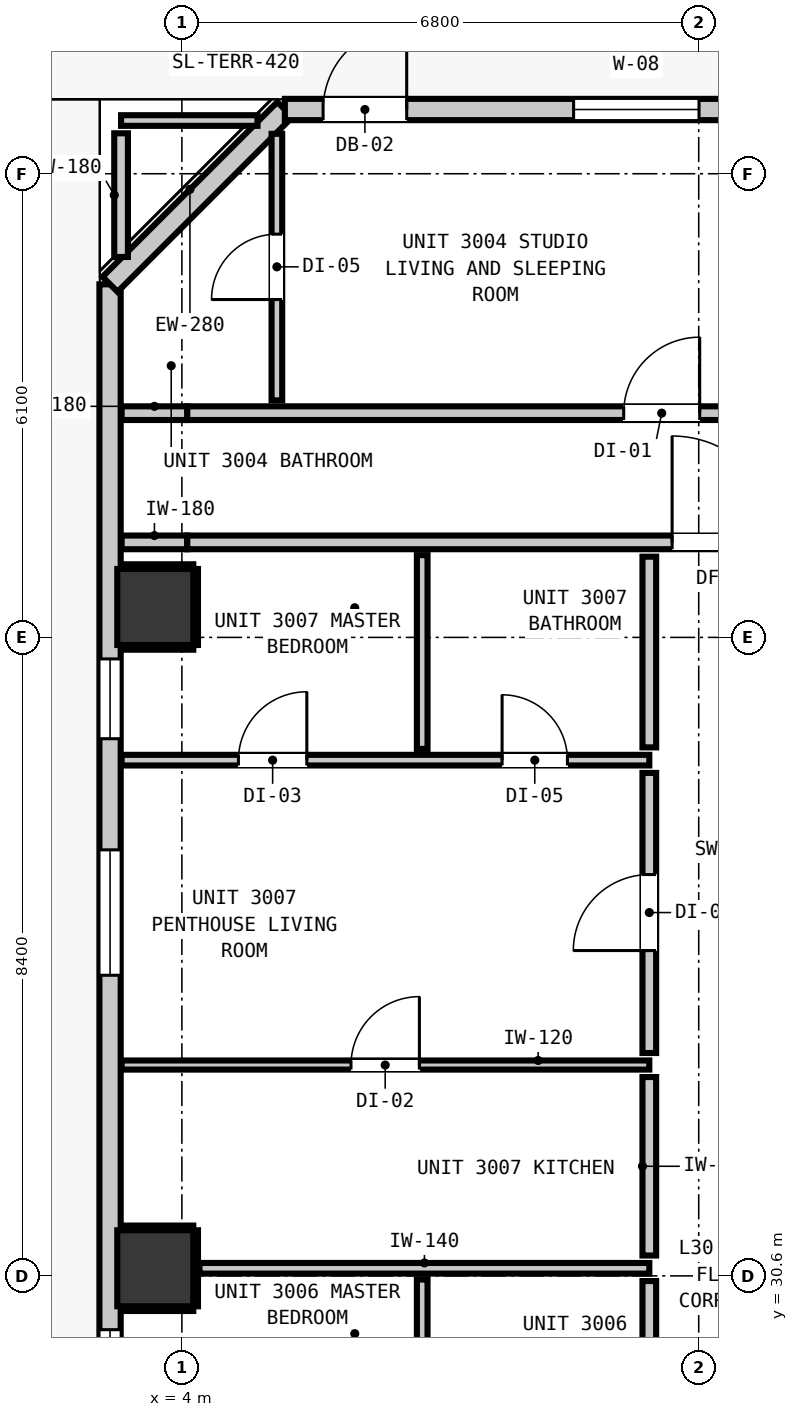
"""IFC4 building model, lengths in metres.
Left out: names, types, materials, properties, quantities, classifications, styles, units other than length and angle.
Written with IfcOpenShell. Run it as: python <this file> out.ifc"""

import sys

from ifc_helpers import new_model, si_unit, direction, frame, frame_2d, origin, origin_2d, place, context, subcontext, project, spatial, rectangle, extrude, element, fill, save


model = new_model("IFC4")
c1 = context("Model", 3, precision=1e-05, world=origin(), true_north=direction((0.0, 1.0)))
c2 = subcontext(c1, "Body", "Model", "MODEL_VIEW")
j1 = project(units=[si_unit("LENGTHUNIT", "METRE"), si_unit("PLANEANGLEUNIT", "RADIAN")], contexts=[c1])
p1 = place(None, origin())
s1 = spatial("IfcSite", under=j1, at=p1, CompositionType="ELEMENT")
p2 = place(p1, origin())
s2 = spatial("IfcBuilding", under=s1, at=p2, CompositionType="ELEMENT")
p3 = place(p2, frame((0.0, 0.0, 106.08)))
s3 = spatial("IfcBuildingStorey", under=s2, at=p3, CompositionType="ELEMENT", Elevation=106.08)
for number, where, z_axis, x_axis in (
    (1, (3.65, 30.7, -0.2), (0.0, 0.0, 1.0), (1.0, 0.0, 0.0)),
    (2, (3.65, 39.4, -0.2), (0.0, 0.0, 1.0), (1.0, 0.0, 0.0)),
):
    element("IfcColumn", number, at=place(p3, frame(where, z_axis=z_axis, x_axis=x_axis)), inside=s3, PredefinedType="COLUMN", context=c2, shape_type="SweptSolid", body=[
        extrude(rectangle(XDim=1.0, YDim=1.0, at=origin_2d()), origin(), (0.0, 0.0, 1.0), 3.52),
    ])
p4 = place(p3, frame((3.055, 11.355, 0.0), z_axis=(0.0, 0.0, 1.0), x_axis=(0.0, 1.0, 0.0)))
e3 = element("IfcWall", 3, at=p4, inside=s3, PredefinedType="STANDARD", context=c2, shape_type="SweptSolid", body=[
    extrude(rectangle(XDim=32.29, YDim=0.28, at=frame_2d((16.145, 0.0))), origin(), (0.0, 0.0, 1.0), 3.08),
])
p5 = place(p4, frame((6.119, 0.0, 0.0)))
e4 = element("IfcOpeningElement", 4, at=p5, cuts=e3, PredefinedType="OPENING", context=c2, shape_type="SweptSolid", body=[
    extrude(rectangle(XDim=1.1, YDim=2.15, at=frame_2d((0.55, 1.075))), frame((0.0, 0.15, 0.0), z_axis=(0.0, -1.0, 0.0), x_axis=(1.0, 0.0, 0.0)), (0.0, 0.0, 1.0), 0.3),
])
p6 = place(p4, frame((0.545, 0.0, 0.85)))
e5 = element("IfcOpeningElement", 5, at=p6, cuts=e3, PredefinedType="OPENING", context=c2, shape_type="SweptSolid", body=[
    extrude(rectangle(XDim=1.05, YDim=1.65, at=frame_2d((0.525, 0.825))), frame((0.0, 0.15, 0.0), z_axis=(0.0, -1.0, 0.0), x_axis=(1.0, 0.0, 0.0)), (0.0, 0.0, 1.0), 0.3),
])
p7 = place(p4, frame((13.649, 0.0, 0.85)))
e6 = element("IfcOpeningElement", 6, at=p7, cuts=e3, PredefinedType="OPENING", context=c2, shape_type="SweptSolid", body=[
    extrude(rectangle(XDim=1.65, YDim=1.75, at=frame_2d((0.825, 0.875))), frame((0.0, 0.15, 0.0), z_axis=(0.0, -1.0, 0.0), x_axis=(1.0, 0.0, 0.0)), (0.0, 0.0, 1.0), 0.3),
])
p8 = place(p4, frame((16.887, 0.0, 0.85)))
e7 = element("IfcOpeningElement", 7, at=p8, cuts=e3, PredefinedType="OPENING", context=c2, shape_type="SweptSolid", body=[
    extrude(rectangle(XDim=1.65, YDim=1.75, at=frame_2d((0.825, 0.875))), frame((0.0, 0.15, 0.0), z_axis=(0.0, -1.0, 0.0), x_axis=(1.0, 0.0, 0.0)), (0.0, 0.0, 1.0), 0.3),
])
p9 = place(p4, frame((23.2, 0.0, 0.85)))
e8 = element("IfcOpeningElement", 8, at=p9, cuts=e3, PredefinedType="OPENING", context=c2, shape_type="SweptSolid", body=[
    extrude(rectangle(XDim=1.65, YDim=1.75, at=frame_2d((0.825, 0.875))), frame((0.0, 0.15, 0.0), z_axis=(0.0, -1.0, 0.0), x_axis=(1.0, 0.0, 0.0)), (0.0, 0.0, 1.0), 0.3),
])
p10 = place(p4, frame((26.312, 0.0, 0.85)))
e9 = element("IfcOpeningElement", 9, at=p10, cuts=e3, PredefinedType="OPENING", context=c2, shape_type="SweptSolid", body=[
    extrude(rectangle(XDim=1.05, YDim=1.65, at=frame_2d((0.525, 0.825))), frame((0.0, 0.15, 0.0), z_axis=(0.0, -1.0, 0.0), x_axis=(1.0, 0.0, 0.0)), (0.0, 0.0, 1.0), 0.3),
])
p11 = place(p3, frame((3.055, 43.645, 0.0), z_axis=(0.0, 0.0, 1.0), x_axis=(0.707106781187, 0.707106781187, 0.0)))
e10 = element("IfcWall", 10, at=p11, inside=s3, PredefinedType="STANDARD", context=c2, shape_type="SweptSolid", body=[
    extrude(rectangle(XDim=3.253, YDim=0.28, at=frame_2d((1.626, 0.0))), origin(), (0.0, 0.0, 1.0), 3.08),
])
p12 = place(p3, frame((5.355, 45.945, 0.0), z_axis=(0.0, 0.0, 1.0), x_axis=(1.0, 0.0, 0.0)))
e11 = element("IfcWall", 11, at=p12, inside=s3, PredefinedType="STANDARD", context=c2, shape_type="SweptSolid", body=[
    extrude(rectangle(XDim=35.09, YDim=0.28, at=frame_2d((17.545, 0.0))), origin(), (0.0, 0.0, 1.0), 3.08),
])
p13 = place(p12, frame((0.503, 0.0, 0.0)))
e12 = element("IfcOpeningElement", 12, at=p13, cuts=e11, PredefinedType="OPENING", context=c2, shape_type="SweptSolid", body=[
    extrude(rectangle(XDim=1.1, YDim=2.15, at=frame_2d((0.55, 1.075))), frame((0.0, 0.15, 0.0), z_axis=(0.0, -1.0, 0.0), x_axis=(1.0, 0.0, 0.0)), (0.0, 0.0, 1.0), 0.3),
])
p14 = place(p12, frame((3.799, 0.0, 0.85)))
e13 = element("IfcOpeningElement", 13, at=p14, cuts=e11, PredefinedType="OPENING", context=c2, shape_type="SweptSolid", body=[
    extrude(rectangle(XDim=1.65, YDim=1.75, at=frame_2d((0.825, 0.875))), frame((0.0, 0.15, 0.0), z_axis=(0.0, -1.0, 0.0), x_axis=(1.0, 0.0, 0.0)), (0.0, 0.0, 1.0), 0.3),
])
p15 = place(p12, frame((18.82, 0.0, 0.85)))
e14 = element("IfcOpeningElement", 14, at=p15, cuts=e11, PredefinedType="OPENING", context=c2, shape_type="SweptSolid", body=[
    extrude(rectangle(XDim=1.65, YDim=1.75, at=frame_2d((0.825, 0.875))), frame((0.0, 0.15, 0.0), z_axis=(0.0, -1.0, 0.0), x_axis=(1.0, 0.0, 0.0)), (0.0, 0.0, 1.0), 0.3),
])
p16 = place(p12, frame((27.709, 0.0, 0.85)))
e15 = element("IfcOpeningElement", 15, at=p16, cuts=e11, PredefinedType="OPENING", context=c2, shape_type="SweptSolid", body=[
    extrude(rectangle(XDim=1.65, YDim=1.75, at=frame_2d((0.825, 0.875))), frame((0.0, 0.15, 0.0), z_axis=(0.0, -1.0, 0.0), x_axis=(1.0, 0.0, 0.0)), (0.0, 0.0, 1.0), 0.3),
])
p17 = place(p3, frame((3.207, 40.25, 0.0), z_axis=(0.0, 0.0, 1.0), x_axis=(1.0, 0.0, 0.0)))
e16 = element("IfcWall", 16, at=p17, inside=s3, PredefinedType="PARTITIONING", context=c2, shape_type="SweptSolid", body=[
    extrude(rectangle(XDim=0.864, YDim=0.18, at=frame_2d((0.432, 0.0))), origin(), (0.0, 0.0, 1.0), 3.08),
])
p18 = place(p3, frame((4.071, 40.25, 0.0), z_axis=(0.0, 0.0, 1.0), x_axis=(1.0, 0.0, 0.0)))
e17 = element("IfcWall", 17, at=p18, inside=s3, PredefinedType="PARTITIONING", context=c2, shape_type="SweptSolid", body=[
    extrude(rectangle(XDim=8.908, YDim=0.18, at=frame_2d((4.454, 0.0))), origin(), (0.0, 0.0, 1.0), 2.565),
])
p19 = place(p18, frame((6.379, 0.0, 0.0)))
e18 = element("IfcOpeningElement", 18, at=p19, cuts=e17, PredefinedType="OPENING", context=c2, shape_type="SweptSolid", body=[
    extrude(rectangle(XDim=1.4, YDim=2.15, at=frame_2d((0.7, 1.075))), frame((0.0, 0.1, 0.0), z_axis=(0.0, -1.0, 0.0), x_axis=(1.0, 0.0, 0.0)), (0.0, 0.0, 1.0), 0.2),
])
p20 = place(p3, frame((3.207, 41.95, 0.0), z_axis=(0.0, 0.0, 1.0), x_axis=(1.0, 0.0, 0.0)))
e19 = element("IfcWall", 19, at=p20, inside=s3, PredefinedType="PARTITIONING", context=c2, shape_type="SweptSolid", body=[
    extrude(rectangle(XDim=0.864, YDim=0.18, at=frame_2d((0.432, 0.0))), origin(), (0.0, 0.0, 1.0), 3.08),
])
p21 = place(p3, frame((4.071, 41.95, 0.0), z_axis=(0.0, 0.0, 1.0), x_axis=(1.0, 0.0, 0.0)))
e20 = element("IfcWall", 20, at=p21, inside=s3, PredefinedType="PARTITIONING", context=c2, shape_type="SweptSolid", body=[
    extrude(rectangle(XDim=8.908, YDim=0.18, at=frame_2d((4.454, 0.0))), origin(), (0.0, 0.0, 1.0), 2.565),
])
p22 = place(p21, frame((5.742, 0.0, 0.0)))
e21 = element("IfcOpeningElement", 21, at=p22, cuts=e20, PredefinedType="OPENING", context=c2, shape_type="SweptSolid", body=[
    extrude(rectangle(XDim=1.0, YDim=2.15, at=frame_2d((0.5, 1.075))), frame((0.0, 0.1, 0.0), z_axis=(0.0, -1.0, 0.0), x_axis=(1.0, 0.0, 0.0)), (0.0, 0.0, 1.0), 0.2),
])
p23 = place(p3, frame((4.232, 30.7, 0.0), z_axis=(0.0, 0.0, 1.0), x_axis=(1.0, 0.0, 0.0)))
e22 = element("IfcWall", 22, at=p23, inside=s3, PredefinedType="PARTITIONING", context=c2, shape_type="SweptSolid", body=[
    extrude(rectangle(XDim=5.918, YDim=0.14, at=frame_2d((2.959, 0.0))), origin(), (0.0, 0.0, 1.0), 2.315),
])
p24 = place(p3, frame((3.207, 37.385, 0.0), z_axis=(0.0, 0.0, 1.0), x_axis=(1.0, 0.0, 0.0)))
e23 = element("IfcWall", 23, at=p24, inside=s3, PredefinedType="PARTITIONING", context=c2, shape_type="SweptSolid", body=[
    extrude(rectangle(XDim=6.943, YDim=0.14, at=frame_2d((3.471, 0.0))), origin(), (0.0, 0.0, 1.0), 3.08),
])
p25 = place(p24, frame((5.006, 0.0, 0.0)))
e24 = element("IfcOpeningElement", 24, at=p25, cuts=e23, PredefinedType="OPENING", context=c2, shape_type="SweptSolid", body=[
    extrude(rectangle(XDim=0.86, YDim=2.02, at=frame_2d((0.43, 1.01))), frame((0.0, 0.08, 0.0), z_axis=(0.0, -1.0, 0.0), x_axis=(1.0, 0.0, 0.0)), (0.0, 0.0, 1.0), 0.16),
])
p26 = place(p24, frame((1.537, 0.0, 0.0)))
e25 = element("IfcOpeningElement", 25, at=p26, cuts=e23, PredefinedType="OPENING", context=c2, shape_type="SweptSolid", body=[
    extrude(rectangle(XDim=0.9, YDim=2.1, at=frame_2d((0.45, 1.05))), frame((0.0, 0.08, 0.0), z_axis=(0.0, -1.0, 0.0), x_axis=(1.0, 0.0, 0.0)), (0.0, 0.0, 1.0), 0.16),
])
p27 = place(p3, frame((3.2, 45.8, 0.0), z_axis=(0.0, 0.0, 1.0), x_axis=(1.0, 0.0, 0.0)))
e26 = element("IfcWall", 26, at=p27, inside=s3, PredefinedType="PARTITIONING", context=c2, shape_type="SweptSolid", body=[
    extrude(rectangle(XDim=1.795, YDim=0.14, at=frame_2d((0.897, 0.0))), origin(), (0.0, 0.0, 1.0), 3.08),
])
p28 = place(p3, frame((3.207, 33.374, 0.0), z_axis=(0.0, 0.0, 1.0), x_axis=(1.0, 0.0, 0.0)))
e27 = element("IfcWall", 27, at=p28, inside=s3, PredefinedType="PARTITIONING", context=c2, shape_type="SweptSolid", body=[
    extrude(rectangle(XDim=6.943, YDim=0.12, at=frame_2d((3.471, 0.0))), origin(), (0.0, 0.0, 1.0), 3.08),
])
p29 = place(p28, frame((3.018, 0.0, 0.0)))
e28 = element("IfcOpeningElement", 28, at=p29, cuts=e27, PredefinedType="OPENING", context=c2, shape_type="SweptSolid", body=[
    extrude(rectangle(XDim=0.9, YDim=2.1, at=frame_2d((0.45, 1.05))), frame((0.0, 0.07, 0.0), z_axis=(0.0, -1.0, 0.0), x_axis=(1.0, 0.0, 0.0)), (0.0, 0.0, 1.0), 0.14),
])
p30 = place(p3, frame((3.2, 44.005, 0.0), z_axis=(0.0, 0.0, 1.0), x_axis=(0.0, 1.0, 0.0)))
e29 = element("IfcWall", 29, at=p30, inside=s3, PredefinedType="PARTITIONING", context=c2, shape_type="SweptSolid", body=[
    extrude(rectangle(XDim=1.627, YDim=0.18, at=frame_2d((0.813, 0.0))), origin(), (0.0, 0.0, 1.0), 3.08),
])
p31 = place(p3, frame((10.15, 28.003, 0.0), z_axis=(0.0, 0.0, 1.0), x_axis=(0.0, 1.0, 0.0)))
e30 = element("IfcWall", 30, at=p31, inside=s3, PredefinedType="PARTITIONING", context=c2, shape_type="SweptSolid", body=[
    extrude(rectangle(XDim=2.529, YDim=0.18, at=frame_2d((1.265, 0.0))), origin(), (0.0, 0.0, 1.0), 3.08),
])
p32 = place(p3, frame((10.15, 30.868, 0.0), z_axis=(0.0, 0.0, 1.0), x_axis=(0.0, 1.0, 0.0)))
e31 = element("IfcWall", 31, at=p32, inside=s3, PredefinedType="PARTITIONING", context=c2, shape_type="SweptSolid", body=[
    extrude(rectangle(XDim=2.348, YDim=0.18, at=frame_2d((1.174, 0.0))), origin(), (0.0, 0.0, 1.0), 3.08),
])
p33 = place(p3, frame((10.15, 33.532, 0.0), z_axis=(0.0, 0.0, 1.0), x_axis=(0.0, 1.0, 0.0)))
e32 = element("IfcWall", 32, at=p33, inside=s3, PredefinedType="PARTITIONING", context=c2, shape_type="SweptSolid", body=[
    extrude(rectangle(XDim=3.685, YDim=0.18, at=frame_2d((1.843, 0.0))), origin(), (0.0, 0.0, 1.0), 3.08),
])
p34 = place(p33, frame((1.348, 0.0, 0.0)))
e33 = element("IfcOpeningElement", 33, at=p34, cuts=e32, PredefinedType="OPENING", context=c2, shape_type="SweptSolid", body=[
    extrude(rectangle(XDim=1.0, YDim=2.15, at=frame_2d((0.5, 1.075))), frame((0.0, 0.1, 0.0), z_axis=(0.0, -1.0, 0.0), x_axis=(1.0, 0.0, 0.0)), (0.0, 0.0, 1.0), 0.2),
])
p35 = place(p3, frame((10.15, 37.553, 0.0), z_axis=(0.0, 0.0, 1.0), x_axis=(0.0, 1.0, 0.0)))
e34 = element("IfcWall", 34, at=p35, inside=s3, PredefinedType="PARTITIONING", context=c2, shape_type="SweptSolid", body=[
    extrude(rectangle(XDim=2.509, YDim=0.18, at=frame_2d((1.254, 0.0))), origin(), (0.0, 0.0, 1.0), 3.08),
])
p36 = place(p3, frame((5.25, 42.118, 0.0), z_axis=(0.0, 0.0, 1.0), x_axis=(0.0, 1.0, 0.0)))
e35 = element("IfcWall", 35, at=p36, inside=s3, PredefinedType="PARTITIONING", context=c2, shape_type="SweptSolid", body=[
    extrude(rectangle(XDim=3.507, YDim=0.14, at=frame_2d((1.753, 0.0))), origin(), (0.0, 0.0, 1.0), 3.08),
])
p37 = place(p36, frame((1.327, 0.0, 0.0)))
e36 = element("IfcOpeningElement", 36, at=p37, cuts=e35, PredefinedType="OPENING", context=c2, shape_type="SweptSolid", body=[
    extrude(rectangle(XDim=0.86, YDim=2.02, at=frame_2d((0.43, 1.01))), frame((0.0, 0.08, 0.0), z_axis=(0.0, -1.0, 0.0), x_axis=(1.0, 0.0, 0.0)), (0.0, 0.0, 1.0), 0.16),
])
p38 = place(p3, frame((7.162, 27.983, 0.0), z_axis=(0.0, 0.0, 1.0), x_axis=(0.0, 1.0, 0.0)))
e37 = element("IfcWall", 37, at=p38, inside=s3, PredefinedType="PARTITIONING", context=c2, shape_type="SweptSolid", body=[
    extrude(rectangle(XDim=2.569, YDim=0.14, at=frame_2d((1.285, 0.0))), origin(), (0.0, 0.0, 1.0), 3.08),
])
p39 = place(p3, frame((7.162, 37.533, 0.0), z_axis=(0.0, 0.0, 1.0), x_axis=(0.0, 1.0, 0.0)))
e38 = element("IfcWall", 38, at=p39, inside=s3, PredefinedType="PARTITIONING", context=c2, shape_type="SweptSolid", body=[
    extrude(rectangle(XDim=2.549, YDim=0.14, at=frame_2d((1.274, 0.0))), origin(), (0.0, 0.0, 1.0), 3.08),
])
for number, where, z_axis, x_axis in (
    (39, (3.21, 30.168, 0.0), (0.0, 0.0, 1.0), (1.0, 0.0, 0.0)),
    (40, (3.21, 31.232, 0.0), (0.0, 0.0, 1.0), (1.0, 0.0, 0.0)),
):
    element("IfcWall", number, at=place(p3, frame(where, z_axis=z_axis, x_axis=x_axis)), inside=s3, PredefinedType="PARTITIONING", context=c2, shape_type="SweptSolid", body=[
        extrude(rectangle(XDim=0.94, YDim=0.06, at=frame_2d((0.47, 0.0))), origin(), (0.0, 0.0, 1.0), 1.45),
    ])
p40 = place(p3, frame((4.182, 30.2, 0.0), z_axis=(0.0, 0.0, 1.0), x_axis=(0.0, 1.0, 0.0)))
e41 = element("IfcWall", 41, at=p40, inside=s3, PredefinedType="PARTITIONING", context=c2, shape_type="SweptSolid", body=[
    extrude(rectangle(XDim=1.0, YDim=0.06, at=frame_2d((0.5, 0.0))), origin(), (0.0, 0.0, 1.0), 1.45),
])
for number, where, z_axis, x_axis in (
    (42, (3.21, 38.868, 0.0), (0.0, 0.0, 1.0), (1.0, 0.0, 0.0)),
    (43, (3.21, 39.932, 0.0), (0.0, 0.0, 1.0), (1.0, 0.0, 0.0)),
):
    element("IfcWall", number, at=place(p3, frame(where, z_axis=z_axis, x_axis=x_axis)), inside=s3, PredefinedType="PARTITIONING", context=c2, shape_type="SweptSolid", body=[
        extrude(rectangle(XDim=0.94, YDim=0.06, at=frame_2d((0.47, 0.0))), origin(), (0.0, 0.0, 1.0), 1.45),
    ])
p41 = place(p3, frame((4.182, 38.9, 0.0), z_axis=(0.0, 0.0, 1.0), x_axis=(0.0, 1.0, 0.0)))
e44 = element("IfcWall", 44, at=p41, inside=s3, PredefinedType="PARTITIONING", context=c2, shape_type="SweptSolid", body=[
    extrude(rectangle(XDim=1.0, YDim=0.06, at=frame_2d((0.5, 0.0))), origin(), (0.0, 0.0, 1.0), 1.45),
])
p42 = place(p13, origin())
e45 = element("IfcDoor", 45, at=p42, inside=s3, OperationType="SINGLE_SWING_RIGHT", PredefinedType="DOOR", context=c2, shape_type="SweptSolid", body=[
    extrude(rectangle(XDim=1.1, YDim=2.15, at=frame_2d((0.55, 1.075))), frame((0.0, 0.025, 0.0), z_axis=(0.0, -1.0, 0.0), x_axis=(1.0, 0.0, 0.0)), (0.0, 0.0, 1.0), 0.05),
])
fill(e12, e45)
p43 = place(p8, origin())
e46 = element("IfcWindow", 46, at=p43, inside=s3, PartitioningType="SINGLE_PANEL", PredefinedType="WINDOW", context=c2, shape_type="SweptSolid", body=[
    extrude(rectangle(XDim=1.65, YDim=1.75, at=frame_2d((0.825, 0.875))), frame((0.0, 0.03, 0.0), z_axis=(0.0, -1.0, 0.0), x_axis=(1.0, 0.0, 0.0)), (0.0, 0.0, 1.0), 0.06),
])
fill(e7, e46)
p44 = place(p9, origin())
e47 = element("IfcWindow", 47, at=p44, inside=s3, PartitioningType="SINGLE_PANEL", PredefinedType="WINDOW", context=c2, shape_type="SweptSolid", body=[
    extrude(rectangle(XDim=1.65, YDim=1.75, at=frame_2d((0.825, 0.875))), frame((0.0, 0.03, 0.0), z_axis=(0.0, -1.0, 0.0), x_axis=(1.0, 0.0, 0.0)), (0.0, 0.0, 1.0), 0.06),
])
fill(e8, e47)
p45 = place(p10, origin())
e48 = element("IfcWindow", 48, at=p45, inside=s3, PartitioningType="SINGLE_PANEL", PredefinedType="WINDOW", context=c2, shape_type="SweptSolid", body=[
    extrude(rectangle(XDim=1.05, YDim=1.65, at=frame_2d((0.525, 0.825))), frame((0.0, 0.03, 0.0), z_axis=(0.0, -1.0, 0.0), x_axis=(1.0, 0.0, 0.0)), (0.0, 0.0, 1.0), 0.06),
])
fill(e9, e48)
p46 = place(p14, origin())
e49 = element("IfcWindow", 49, at=p46, inside=s3, PartitioningType="SINGLE_PANEL", PredefinedType="WINDOW", context=c2, shape_type="SweptSolid", body=[
    extrude(rectangle(XDim=1.65, YDim=1.75, at=frame_2d((0.825, 0.875))), frame((0.0, 0.03, 0.0), z_axis=(0.0, -1.0, 0.0), x_axis=(1.0, 0.0, 0.0)), (0.0, 0.0, 1.0), 0.06),
])
fill(e13, e49)
p47 = place(p19, origin())
e50 = element("IfcDoor", 50, at=p47, inside=s3, OperationType="SINGLE_SWING_LEFT", PredefinedType="DOOR", context=c2, shape_type="SweptSolid", body=[
    extrude(rectangle(XDim=1.4, YDim=2.15, at=frame_2d((0.7, 1.075))), frame((0.0, 0.025, 0.0), z_axis=(0.0, -1.0, 0.0), x_axis=(1.0, 0.0, 0.0)), (0.0, 0.0, 1.0), 0.05),
])
fill(e18, e50)
p48 = place(p22, origin())
e51 = element("IfcDoor", 51, at=p48, inside=s3, OperationType="SINGLE_SWING_RIGHT", PredefinedType="DOOR", context=c2, shape_type="SweptSolid", body=[
    extrude(rectangle(XDim=1.0, YDim=2.15, at=frame_2d((0.5, 1.075))), frame((0.0, 0.025, 0.0), z_axis=(0.0, -1.0, 0.0), x_axis=(1.0, 0.0, 0.0)), (0.0, 0.0, 1.0), 0.05),
])
fill(e21, e51)
p49 = place(p37, origin())
e52 = element("IfcDoor", 52, at=p49, inside=s3, OperationType="SINGLE_SWING_LEFT", PredefinedType="DOOR", context=c2, shape_type="SweptSolid", body=[
    extrude(rectangle(XDim=0.86, YDim=2.02, at=frame_2d((0.43, 1.01))), frame((0.0, 0.025, 0.0), z_axis=(0.0, -1.0, 0.0), x_axis=(1.0, 0.0, 0.0)), (0.0, 0.0, 1.0), 0.05),
])
fill(e36, e52)
p50 = place(p34, origin())
e53 = element("IfcDoor", 53, at=p50, inside=s3, OperationType="SINGLE_SWING_LEFT", PredefinedType="DOOR", context=c2, shape_type="SweptSolid", body=[
    extrude(rectangle(XDim=1.0, YDim=2.15, at=frame_2d((0.5, 1.075))), frame((0.0, 0.025, 0.0), z_axis=(0.0, -1.0, 0.0), x_axis=(1.0, 0.0, 0.0)), (0.0, 0.0, 1.0), 0.05),
])
fill(e33, e53)
p51 = place(p29, origin())
e54 = element("IfcDoor", 54, at=p51, inside=s3, OperationType="SINGLE_SWING_RIGHT", PredefinedType="DOOR", context=c2, shape_type="SweptSolid", body=[
    extrude(rectangle(XDim=0.9, YDim=2.1, at=frame_2d((0.45, 1.05))), frame((0.0, 0.025, 0.0), z_axis=(0.0, -1.0, 0.0), x_axis=(1.0, 0.0, 0.0)), (0.0, 0.0, 1.0), 0.05),
])
fill(e28, e54)
p52 = place(p25, origin())
e55 = element("IfcDoor", 55, at=p52, inside=s3, OperationType="SINGLE_SWING_LEFT", PredefinedType="DOOR", context=c2, shape_type="SweptSolid", body=[
    extrude(rectangle(XDim=0.86, YDim=2.02, at=frame_2d((0.43, 1.01))), frame((0.0, 0.025, 0.0), z_axis=(0.0, -1.0, 0.0), x_axis=(1.0, 0.0, 0.0)), (0.0, 0.0, 1.0), 0.05),
])
fill(e24, e55)
p53 = place(p26, origin())
e56 = element("IfcDoor", 56, at=p53, inside=s3, OperationType="SINGLE_SWING_RIGHT", PredefinedType="DOOR", context=c2, shape_type="SweptSolid", body=[
    extrude(rectangle(XDim=0.9, YDim=2.1, at=frame_2d((0.45, 1.05))), frame((0.0, 0.025, 0.0), z_axis=(0.0, -1.0, 0.0), x_axis=(1.0, 0.0, 0.0)), (0.0, 0.0, 1.0), 0.05),
])
fill(e25, e56)
save(model, sys.argv[1])
